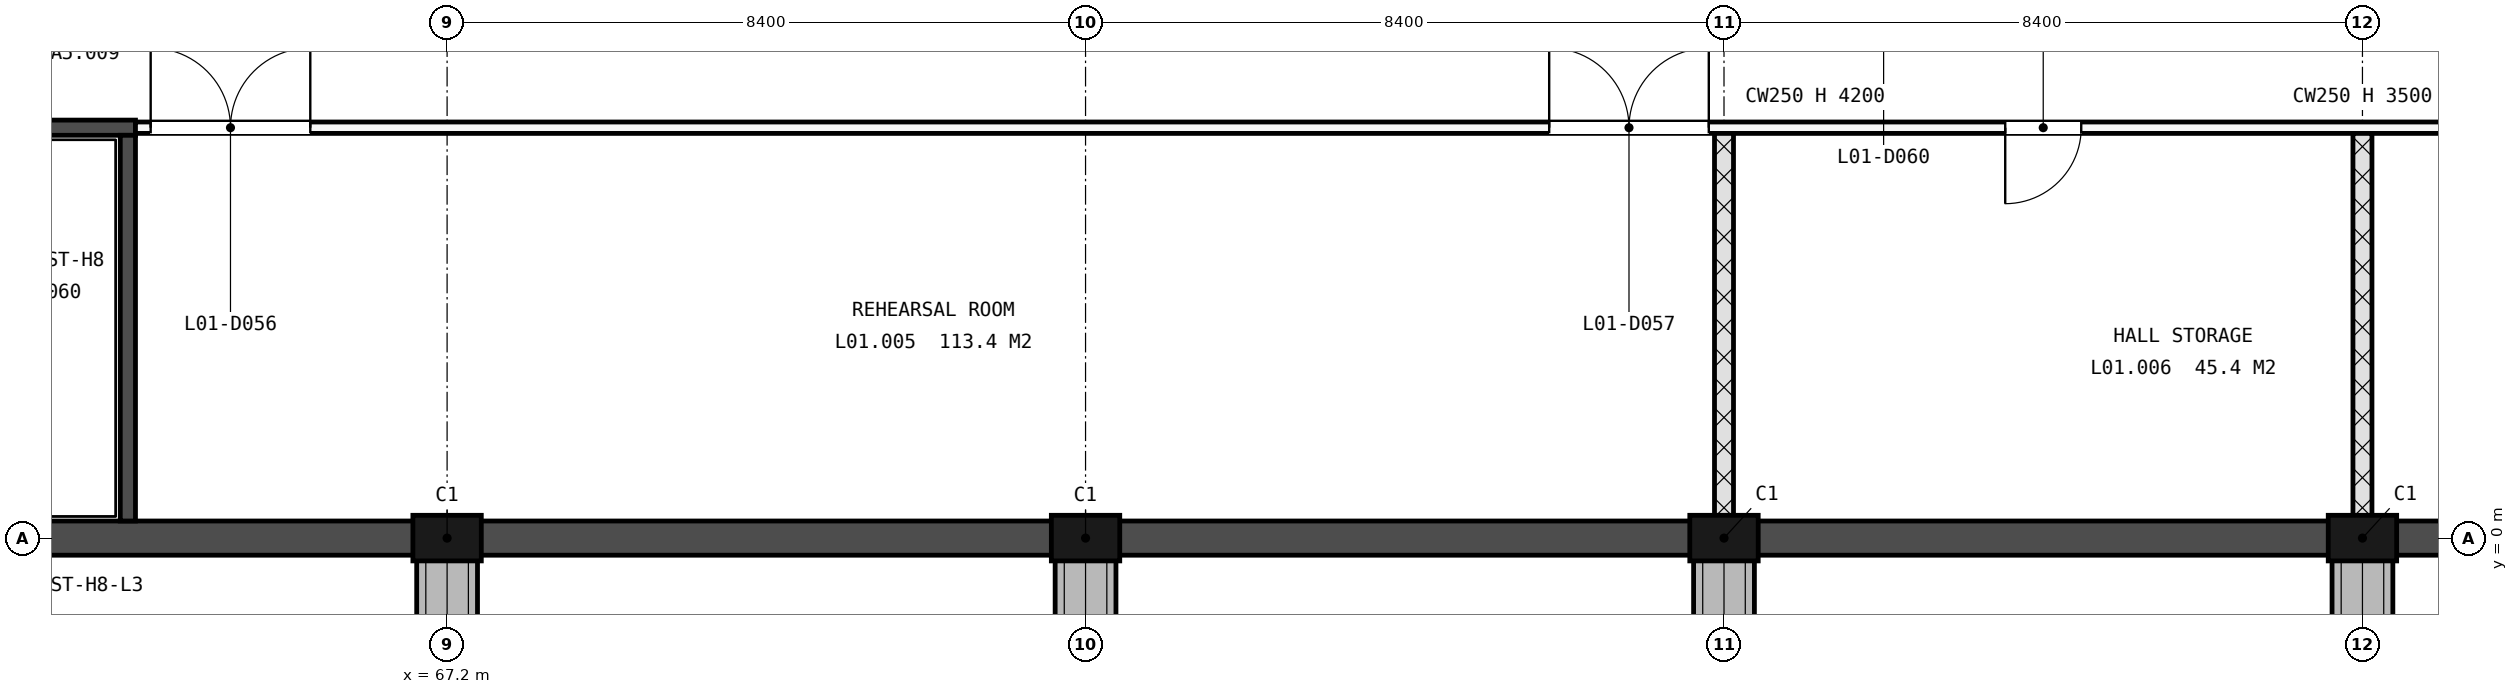
"""IFC4 building model, lengths in metres.
Left out: names, types, materials, properties, quantities, classifications, styles, units other than length and angle.
Written with IfcOpenShell. Run it as: python <this file> out.ifc"""

import sys

from ifc_helpers import new_model, si_unit, direction, frame, frame_2d, origin, origin_2d, place, context, subcontext, project, spatial, rectangle, extrude, element, fill, save


model = new_model("IFC4")
c1 = context("Model", 3, precision=1e-05, world=origin(), true_north=direction((0.0, 1.0)))
c2 = subcontext(c1, "Body", "Model", "MODEL_VIEW")
j1 = project(units=[si_unit("LENGTHUNIT", "METRE"), si_unit("PLANEANGLEUNIT", "RADIAN")], contexts=[c1])
p1 = place(None, origin())
s1 = spatial("IfcSite", under=j1, at=p1, CompositionType="ELEMENT")
p2 = place(p1, origin())
s2 = spatial("IfcBuilding", under=s1, at=p2, CompositionType="ELEMENT")
p3 = place(p2, frame((0.0, 0.0, 5.4)))
s3 = spatial("IfcBuildingStorey", under=s2, at=p3, CompositionType="ELEMENT", Elevation=5.4)
for number, where, z_axis, x_axis in (
    (1, (67.2, 0.0, -0.3), (0.0, 0.0, 1.0), (1.0, 0.0, 0.0)),
    (2, (75.6, 0.0, -0.3), (0.0, 0.0, 1.0), (1.0, 0.0, 0.0)),
    (3, (84.0, 0.0, -0.3), (0.0, 0.0, 1.0), (1.0, 0.0, 0.0)),
    (4, (92.4, 0.0, -0.3), (0.0, 0.0, 1.0), (1.0, 0.0, 0.0)),
):
    element("IfcColumn", number, at=place(p3, frame(where, z_axis=z_axis, x_axis=x_axis)), inside=s3, PredefinedType="PILASTER", context=c2, shape_type="SweptSolid", body=[
        extrude(rectangle(XDim=0.9, YDim=0.6, at=origin_2d()), origin(), (0.0, 0.0, 1.0), 4.55),
    ])
p4 = place(p3, frame((0.0, 0.0, -0.3), z_axis=(0.0, 0.0, 1.0), x_axis=(1.0, 0.0, 0.0)))
e5 = element("IfcWall", 5, at=p4, inside=s3, PredefinedType="SOLIDWALL", context=c2, shape_type="SweptSolid", body=[
    extrude(rectangle(XDim=168.0, YDim=0.45, at=frame_2d((84.0, 0.0))), origin(), (0.0, 0.0, 1.0), 4.55),
])
p5 = place(p4, frame((27.075, 0.0, 1.5)))
e6 = element("IfcOpeningElement", 6, at=p5, cuts=e5, PredefinedType="OPENING", context=c2, shape_type="SweptSolid", body=[
    extrude(rectangle(XDim=0.45, YDim=2.4, at=frame_2d((0.225, 1.2))), frame((0.0, 0.235, 0.0), z_axis=(0.0, -1.0, 0.0), x_axis=(1.0, 0.0, 0.0)), (0.0, 0.0, 1.0), 0.47),
])
p6 = place(p4, frame((31.275, 0.0, 1.5)))
e7 = element("IfcOpeningElement", 7, at=p6, cuts=e5, PredefinedType="OPENING", context=c2, shape_type="SweptSolid", body=[
    extrude(rectangle(XDim=0.45, YDim=2.4, at=frame_2d((0.225, 1.2))), frame((0.0, 0.235, 0.0), z_axis=(0.0, -1.0, 0.0), x_axis=(1.0, 0.0, 0.0)), (0.0, 0.0, 1.0), 0.47),
])
p7 = place(p4, frame((35.475, 0.0, 1.5)))
e8 = element("IfcOpeningElement", 8, at=p7, cuts=e5, PredefinedType="OPENING", context=c2, shape_type="SweptSolid", body=[
    extrude(rectangle(XDim=0.45, YDim=2.4, at=frame_2d((0.225, 1.2))), frame((0.0, 0.235, 0.0), z_axis=(0.0, -1.0, 0.0), x_axis=(1.0, 0.0, 0.0)), (0.0, 0.0, 1.0), 0.47),
])
p8 = place(p4, frame((39.675, 0.0, 1.5)))
e9 = element("IfcOpeningElement", 9, at=p8, cuts=e5, PredefinedType="OPENING", context=c2, shape_type="SweptSolid", body=[
    extrude(rectangle(XDim=0.45, YDim=2.4, at=frame_2d((0.225, 1.2))), frame((0.0, 0.235, 0.0), z_axis=(0.0, -1.0, 0.0), x_axis=(1.0, 0.0, 0.0)), (0.0, 0.0, 1.0), 0.47),
])
p9 = place(p4, frame((94.275, 0.0, 1.5)))
e10 = element("IfcOpeningElement", 10, at=p9, cuts=e5, PredefinedType="OPENING", context=c2, shape_type="SweptSolid", body=[
    extrude(rectangle(XDim=0.45, YDim=2.4, at=frame_2d((0.225, 1.2))), frame((0.0, 0.235, 0.0), z_axis=(0.0, -1.0, 0.0), x_axis=(1.0, 0.0, 0.0)), (0.0, 0.0, 1.0), 0.47),
])
p10 = place(p4, frame((98.475, 0.0, 1.5)))
e11 = element("IfcOpeningElement", 11, at=p10, cuts=e5, PredefinedType="OPENING", context=c2, shape_type="SweptSolid", body=[
    extrude(rectangle(XDim=0.45, YDim=2.4, at=frame_2d((0.225, 1.2))), frame((0.0, 0.235, 0.0), z_axis=(0.0, -1.0, 0.0), x_axis=(1.0, 0.0, 0.0)), (0.0, 0.0, 1.0), 0.47),
])
p11 = place(p4, frame((102.675, 0.0, 1.5)))
e12 = element("IfcOpeningElement", 12, at=p11, cuts=e5, PredefinedType="OPENING", context=c2, shape_type="SweptSolid", body=[
    extrude(rectangle(XDim=0.45, YDim=2.4, at=frame_2d((0.225, 1.2))), frame((0.0, 0.235, 0.0), z_axis=(0.0, -1.0, 0.0), x_axis=(1.0, 0.0, 0.0)), (0.0, 0.0, 1.0), 0.47),
])
p12 = place(p4, frame((106.875, 0.0, 1.5)))
e13 = element("IfcOpeningElement", 13, at=p12, cuts=e5, PredefinedType="OPENING", context=c2, shape_type="SweptSolid", body=[
    extrude(rectangle(XDim=0.45, YDim=2.4, at=frame_2d((0.225, 1.2))), frame((0.0, 0.235, 0.0), z_axis=(0.0, -1.0, 0.0), x_axis=(1.0, 0.0, 0.0)), (0.0, 0.0, 1.0), 0.47),
])
p13 = place(p4, frame((111.075, 0.0, 1.5)))
e14 = element("IfcOpeningElement", 14, at=p13, cuts=e5, PredefinedType="OPENING", context=c2, shape_type="SweptSolid", body=[
    extrude(rectangle(XDim=0.45, YDim=2.4, at=frame_2d((0.225, 1.2))), frame((0.0, 0.235, 0.0), z_axis=(0.0, -1.0, 0.0), x_axis=(1.0, 0.0, 0.0)), (0.0, 0.0, 1.0), 0.47),
])
p14 = place(p4, frame((115.275, 0.0, 1.5)))
e15 = element("IfcOpeningElement", 15, at=p14, cuts=e5, PredefinedType="OPENING", context=c2, shape_type="SweptSolid", body=[
    extrude(rectangle(XDim=0.45, YDim=2.4, at=frame_2d((0.225, 1.2))), frame((0.0, 0.235, 0.0), z_axis=(0.0, -1.0, 0.0), x_axis=(1.0, 0.0, 0.0)), (0.0, 0.0, 1.0), 0.47),
])
p15 = place(p4, frame((127.875, 0.0, 1.5)))
e16 = element("IfcOpeningElement", 16, at=p15, cuts=e5, PredefinedType="OPENING", context=c2, shape_type="SweptSolid", body=[
    extrude(rectangle(XDim=0.45, YDim=2.4, at=frame_2d((0.225, 1.2))), frame((0.0, 0.235, 0.0), z_axis=(0.0, -1.0, 0.0), x_axis=(1.0, 0.0, 0.0)), (0.0, 0.0, 1.0), 0.47),
])
p16 = place(p4, frame((132.075, 0.0, 1.5)))
e17 = element("IfcOpeningElement", 17, at=p16, cuts=e5, PredefinedType="OPENING", context=c2, shape_type="SweptSolid", body=[
    extrude(rectangle(XDim=0.45, YDim=2.4, at=frame_2d((0.225, 1.2))), frame((0.0, 0.235, 0.0), z_axis=(0.0, -1.0, 0.0), x_axis=(1.0, 0.0, 0.0)), (0.0, 0.0, 1.0), 0.47),
])
p17 = place(p4, frame((136.275, 0.0, 1.5)))
e18 = element("IfcOpeningElement", 18, at=p17, cuts=e5, PredefinedType="OPENING", context=c2, shape_type="SweptSolid", body=[
    extrude(rectangle(XDim=0.45, YDim=2.4, at=frame_2d((0.225, 1.2))), frame((0.0, 0.235, 0.0), z_axis=(0.0, -1.0, 0.0), x_axis=(1.0, 0.0, 0.0)), (0.0, 0.0, 1.0), 0.47),
])
p18 = place(p4, frame((140.475, 0.0, 1.5)))
e19 = element("IfcOpeningElement", 19, at=p18, cuts=e5, PredefinedType="OPENING", context=c2, shape_type="SweptSolid", body=[
    extrude(rectangle(XDim=0.45, YDim=2.4, at=frame_2d((0.225, 1.2))), frame((0.0, 0.235, 0.0), z_axis=(0.0, -1.0, 0.0), x_axis=(1.0, 0.0, 0.0)), (0.0, 0.0, 1.0), 0.47),
])
p19 = place(p4, frame((144.675, 0.0, 1.5)))
e20 = element("IfcOpeningElement", 20, at=p19, cuts=e5, PredefinedType="OPENING", context=c2, shape_type="SweptSolid", body=[
    extrude(rectangle(XDim=0.45, YDim=2.4, at=frame_2d((0.225, 1.2))), frame((0.0, 0.235, 0.0), z_axis=(0.0, -1.0, 0.0), x_axis=(1.0, 0.0, 0.0)), (0.0, 0.0, 1.0), 0.47),
])
p20 = place(p4, frame((148.875, 0.0, 1.5)))
e21 = element("IfcOpeningElement", 21, at=p20, cuts=e5, PredefinedType="OPENING", context=c2, shape_type="SweptSolid", body=[
    extrude(rectangle(XDim=0.45, YDim=2.4, at=frame_2d((0.225, 1.2))), frame((0.0, 0.235, 0.0), z_axis=(0.0, -1.0, 0.0), x_axis=(1.0, 0.0, 0.0)), (0.0, 0.0, 1.0), 0.47),
])
p21 = place(p4, frame((153.075, 0.0, 1.5)))
e22 = element("IfcOpeningElement", 22, at=p21, cuts=e5, PredefinedType="OPENING", context=c2, shape_type="SweptSolid", body=[
    extrude(rectangle(XDim=0.45, YDim=2.4, at=frame_2d((0.225, 1.2))), frame((0.0, 0.235, 0.0), z_axis=(0.0, -1.0, 0.0), x_axis=(1.0, 0.0, 0.0)), (0.0, 0.0, 1.0), 0.47),
])
p22 = place(p4, frame((157.275, 0.0, 1.5)))
e23 = element("IfcOpeningElement", 23, at=p22, cuts=e5, PredefinedType="OPENING", context=c2, shape_type="SweptSolid", body=[
    extrude(rectangle(XDim=0.45, YDim=2.4, at=frame_2d((0.225, 1.2))), frame((0.0, 0.235, 0.0), z_axis=(0.0, -1.0, 0.0), x_axis=(1.0, 0.0, 0.0)), (0.0, 0.0, 1.0), 0.47),
])
for number, where, z_axis, x_axis in (
    (24, (67.2, -0.225, -0.3), (0.0, 0.0, 1.0), (0.0, -1.0, 0.0)),
    (25, (75.6, -0.225, -0.3), (0.0, 0.0, 1.0), (0.0, -1.0, 0.0)),
    (26, (84.0, -0.225, -0.3), (0.0, 0.0, 1.0), (0.0, -1.0, 0.0)),
    (27, (92.4, -0.225, -0.3), (0.0, 0.0, 1.0), (0.0, -1.0, 0.0)),
):
    element("IfcWall", number, at=place(p3, frame(where, z_axis=z_axis, x_axis=x_axis)), inside=s3, PredefinedType="SOLIDWALL", context=c2, shape_type="SweptSolid", body=[
        extrude(rectangle(XDim=0.9, YDim=0.8, at=frame_2d((0.45, 0.0))), origin(), (0.0, 0.0, 1.0), 4.55),
    ])
p23 = place(p3, frame((54.5, 5.4, -0.3), z_axis=(0.0, 0.0, 1.0), x_axis=(1.0, 0.0, 0.0)))
e28 = element("IfcWall", 28, at=p23, inside=s3, PredefinedType="SHEAR", context=c2, shape_type="SweptSolid", body=[
    extrude(rectangle(XDim=8.6, YDim=0.2, at=frame_2d((4.3, 0.0))), origin(), (0.0, 0.0, 1.0), 4.5),
])
p24 = place(p23, frame((0.35, 0.0, 0.3)))
e29 = element("IfcOpeningElement", 29, at=p24, cuts=e28, PredefinedType="OPENING", context=c2, shape_type="SweptSolid", body=[
    extrude(rectangle(XDim=1.0, YDim=2.1, at=frame_2d((0.5, 1.05))), frame((0.0, 0.11, 0.0), z_axis=(0.0, -1.0, 0.0), x_axis=(1.0, 0.0, 0.0)), (0.0, 0.0, 1.0), 0.22),
])
p25 = place(p3, frame((63.0, 0.225, -0.3), z_axis=(0.0, 0.0, 1.0), x_axis=(0.0, 1.0, 0.0)))
e30 = element("IfcWall", 30, at=p25, inside=s3, PredefinedType="SHEAR", context=c2, shape_type="SweptSolid", body=[
    extrude(rectangle(XDim=5.075, YDim=0.2, at=frame_2d((2.538, 0.0))), origin(), (0.0, 0.0, 1.0), 4.5),
])
p26 = place(p3, frame((63.1, 5.4, 0.0), z_axis=(0.0, 0.0, 1.0), x_axis=(1.0, 0.0, 0.0)))
e31 = element("IfcWall", 31, at=p26, inside=s3, PredefinedType="PARTITIONING", context=c2, shape_type="SweptSolid", body=[
    extrude(rectangle(XDim=54.4, YDim=0.15, at=frame_2d((27.2, 0.0))), origin(), (0.0, 0.0, 1.0), 4.2),
])
p27 = place(p26, frame((0.2, 0.0, 0.0)))
e32 = element("IfcOpeningElement", 32, at=p27, cuts=e31, PredefinedType="OPENING", context=c2, shape_type="SweptSolid", body=[
    extrude(rectangle(XDim=2.1, YDim=2.1, at=frame_2d((1.05, 1.05))), frame((0.0, 0.085, 0.0), z_axis=(0.0, -1.0, 0.0), x_axis=(1.0, 0.0, 0.0)), (0.0, 0.0, 1.0), 0.17),
])
p28 = place(p26, frame((18.6, 0.0, 0.0)))
e33 = element("IfcOpeningElement", 33, at=p28, cuts=e31, PredefinedType="OPENING", context=c2, shape_type="SweptSolid", body=[
    extrude(rectangle(XDim=2.1, YDim=2.1, at=frame_2d((1.05, 1.05))), frame((0.0, 0.085, 0.0), z_axis=(0.0, -1.0, 0.0), x_axis=(1.0, 0.0, 0.0)), (0.0, 0.0, 1.0), 0.17),
])
p29 = place(p26, frame((24.6, 0.0, 0.0)))
e34 = element("IfcOpeningElement", 34, at=p29, cuts=e31, PredefinedType="OPENING", context=c2, shape_type="SweptSolid", body=[
    extrude(rectangle(XDim=1.0, YDim=2.1, at=frame_2d((0.5, 1.05))), frame((0.0, 0.085, 0.0), z_axis=(0.0, -1.0, 0.0), x_axis=(1.0, 0.0, 0.0)), (0.0, 0.0, 1.0), 0.17),
])
p30 = place(p26, frame((41.15, 0.0, 0.0)))
e35 = element("IfcOpeningElement", 35, at=p30, cuts=e31, PredefinedType="OPENING", context=c2, shape_type="SweptSolid", body=[
    extrude(rectangle(XDim=1.5, YDim=2.1, at=frame_2d((0.75, 1.05))), frame((0.0, 0.085, 0.0), z_axis=(0.0, -1.0, 0.0), x_axis=(1.0, 0.0, 0.0)), (0.0, 0.0, 1.0), 0.17),
])
p31 = place(p3, frame((84.0, 0.225, 0.0), z_axis=(0.0, 0.0, 1.0), x_axis=(0.0, 1.0, 0.0)))
e36 = element("IfcWall", 36, at=p31, inside=s3, PredefinedType="SOLIDWALL", context=c2, shape_type="SweptSolid", body=[
    extrude(rectangle(XDim=5.1, YDim=0.25, at=frame_2d((2.55, 0.0))), origin(), (0.0, 0.0, 1.0), 4.2),
])
p32 = place(p3, frame((92.4, 0.225, 0.0), z_axis=(0.0, 0.0, 1.0), x_axis=(0.0, 1.0, 0.0)))
e37 = element("IfcWall", 37, at=p32, inside=s3, PredefinedType="SOLIDWALL", context=c2, shape_type="SweptSolid", body=[
    extrude(rectangle(XDim=5.1, YDim=0.25, at=frame_2d((2.55, 0.0))), origin(), (0.0, 0.0, 1.0), 3.5),
])
p33 = place(p27, origin())
e38 = element("IfcDoor", 38, at=p33, inside=s3, OperationType="DOUBLE_DOOR_SINGLE_SWING", PredefinedType="DOOR", context=c2, shape_type="SweptSolid", body=[
    extrude(rectangle(XDim=2.1, YDim=2.1, at=frame_2d((1.05, 1.05))), frame((0.0, 0.025, 0.0), z_axis=(0.0, -1.0, 0.0), x_axis=(1.0, 0.0, 0.0)), (0.0, 0.0, 1.0), 0.05),
])
fill(e32, e38)
p34 = place(p28, origin())
e39 = element("IfcDoor", 39, at=p34, inside=s3, OperationType="DOUBLE_DOOR_SINGLE_SWING", PredefinedType="DOOR", context=c2, shape_type="SweptSolid", body=[
    extrude(rectangle(XDim=2.1, YDim=2.1, at=frame_2d((1.05, 1.05))), frame((0.0, 0.025, 0.0), z_axis=(0.0, -1.0, 0.0), x_axis=(1.0, 0.0, 0.0)), (0.0, 0.0, 1.0), 0.05),
])
fill(e33, e39)
p35 = place(p29, origin())
e40 = element("IfcDoor", 40, at=p35, inside=s3, OperationType="SINGLE_SWING_LEFT", PredefinedType="DOOR", context=c2, shape_type="SweptSolid", body=[
    extrude(rectangle(XDim=1.0, YDim=2.1, at=frame_2d((0.5, 1.05))), frame((0.0, 0.025, 0.0), z_axis=(0.0, -1.0, 0.0), x_axis=(1.0, 0.0, 0.0)), (0.0, 0.0, 1.0), 0.05),
])
fill(e34, e40)
save(model, sys.argv[1])
